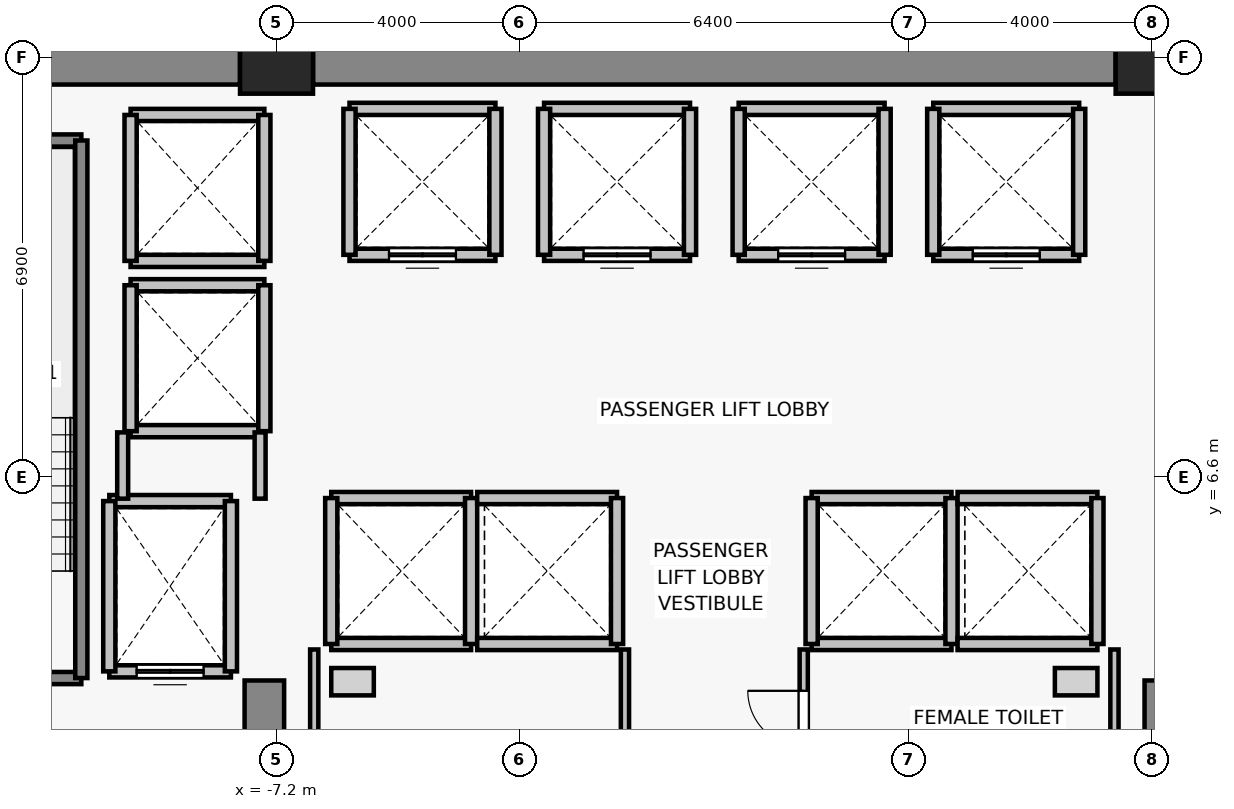
"""IFC4 building model, lengths in metres.
Left out: names, types, materials, properties, quantities, classifications, styles, units other than length and angle.
Written with IfcOpenShell. Run it as: python <this file> out.ifc"""

import sys

from ifc_helpers import new_model, si_unit, direction, frame, frame_2d, origin, origin_2d, place, context, subcontext, project, spatial, rectangle, extrude, source, transform, mapped, element, fill, save


model = new_model("IFC4")
c1 = context("Model", 3, precision=1e-05, world=origin(), true_north=direction((0.0, 1.0)))
c2 = subcontext(c1, "Body", "Model", "MODEL_VIEW")
j1 = project(units=[si_unit("LENGTHUNIT", "METRE"), si_unit("PLANEANGLEUNIT", "RADIAN")], contexts=[c1])
p1 = place(None, origin())
s1 = spatial("IfcSite", under=j1, at=p1, CompositionType="ELEMENT")
p2 = place(p1, origin())
s2 = spatial("IfcBuilding", under=s1, at=p2, CompositionType="ELEMENT")
p3 = place(p2, frame((0.0, 0.0, 60.4)))
s3 = spatial("IfcBuildingStorey", under=s2, at=p3, CompositionType="ELEMENT", Elevation=60.4)
for number, where, z_axis, x_axis in (
    (1, (-7.2, 13.5, 0.0), (0.0, 0.0, 1.0), (1.0, 0.0, 0.0)),
    (2, (7.2, 13.5, 0.0), (0.0, 0.0, 1.0), (1.0, 0.0, 0.0)),
):
    element("IfcColumn", number, at=place(p3, frame(where, z_axis=z_axis, x_axis=x_axis)), inside=s3, PredefinedType="COLUMN", context=c2, shape_type="SweptSolid", body=[
        extrude(rectangle(XDim=1.2, YDim=1.2, at=origin_2d()), origin(), (0.0, 0.0, 1.0), 3.3),
    ])
p4 = place(p3, frame((-13.8, 13.5, 0.0), z_axis=(0.0, 0.0, 1.0), x_axis=(1.0, 0.0, 0.0)))
e3 = element("IfcWall", 3, at=p4, inside=s3, PredefinedType="SHEAR", context=c2, shape_type="SweptSolid", body=[
    extrude(rectangle(XDim=6.0, YDim=0.9, at=frame_2d((3.0, 0.0))), origin(), (0.0, 0.0, 1.0), 3.075),
])
p5 = place(p3, frame((-6.6, 13.5, 0.0), z_axis=(0.0, 0.0, 1.0), x_axis=(1.0, 0.0, 0.0)))
e4 = element("IfcWall", 4, at=p5, inside=s3, PredefinedType="SHEAR", context=c2, shape_type="SweptSolid", body=[
    extrude(rectangle(XDim=13.2, YDim=0.9, at=frame_2d((6.6, 0.0))), origin(), (0.0, 0.0, 1.0), 3.075),
])
for number, where, z_axis, x_axis in (
    (5, (-7.4, -0.75, 0.0), (0.0, 0.0, 1.0), (0.0, 1.0, 0.0)),
    (6, (7.4, -0.75, 0.0), (0.0, 0.0, 1.0), (0.0, 1.0, 0.0)),
):
    element("IfcWall", number, at=place(p3, frame(where, z_axis=z_axis, x_axis=x_axis)), inside=s3, PredefinedType="SHEAR", context=c2, shape_type="SweptSolid", body=[
        extrude(rectangle(XDim=4.0, YDim=0.65, at=frame_2d((2.0, 0.0))), origin(), (0.0, 0.0, 1.0), 3.075),
    ])
p6 = place(p3, frame((-7.95, 3.4, 0.0), z_axis=(0.0, 0.0, 1.0), x_axis=(-1.0, 0.0, 0.0)))
e7 = element("IfcWall", 7, at=p6, inside=s3, PredefinedType="SOLIDWALL", context=c2, shape_type="SweptSolid", body=[
    extrude(rectangle(XDim=2.0, YDim=0.2, at=frame_2d((1.0, 0.0))), origin(), (0.0, 0.0, 1.0), 3.075),
])
p7 = place(p6, frame((0.45, 0.0, 0.0)))
e8 = element("IfcOpeningElement", 8, at=p7, cuts=e7, PredefinedType="OPENING", context=c2, shape_type="SweptSolid", body=[
    extrude(rectangle(XDim=1.1, YDim=2.2, at=frame_2d((0.55, 1.1))), frame((0.0, 0.11, 0.0), z_axis=(0.0, -1.0, 0.0), x_axis=(1.0, 0.0, 0.0)), (0.0, 0.0, 1.0), 0.22),
])
p8 = place(p3, frame((-9.95, 6.2, 0.0), z_axis=(0.0, 0.0, 1.0), x_axis=(1.0, 0.0, 0.0)))
e9 = element("IfcWall", 9, at=p8, inside=s3, PredefinedType="SOLIDWALL", context=c2, shape_type="SweptSolid", body=[
    extrude(rectangle(XDim=2.0, YDim=0.2, at=frame_2d((1.0, 0.0))), origin(), (0.0, 0.0, 1.0), 3.075),
])
for number, where, z_axis, x_axis in (
    (10, (-9.95, 3.4, 0.0), (0.0, 0.0, 1.0), (0.0, 1.0, 0.0)),
    (11, (-7.95, 6.2, 0.0), (0.0, 0.0, 1.0), (0.0, -1.0, 0.0)),
):
    element("IfcWall", number, at=place(p3, frame(where, z_axis=z_axis, x_axis=x_axis)), inside=s3, PredefinedType="SOLIDWALL", context=c2, shape_type="SweptSolid", body=[
        extrude(rectangle(XDim=2.8, YDim=0.2, at=frame_2d((1.4, 0.0))), origin(), (0.0, 0.0, 1.0), 3.075),
    ])
p9 = place(p3, frame((-3.6, 10.25, 0.0), z_axis=(0.0, 0.0, 1.0), x_axis=(-1.0, 0.0, 0.0)))
e12 = element("IfcWall", 12, at=p9, inside=s3, PredefinedType="SOLIDWALL", context=c2, shape_type="SweptSolid", body=[
    extrude(rectangle(XDim=2.4, YDim=0.2, at=frame_2d((1.2, 0.0))), origin(), (0.0, 0.0, 1.0), 3.075),
])
p10 = place(p9, frame((0.65, 0.0, 0.0)))
e13 = element("IfcOpeningElement", 13, at=p10, cuts=e12, PredefinedType="OPENING", context=c2, shape_type="SweptSolid", body=[
    extrude(rectangle(XDim=1.1, YDim=2.2, at=frame_2d((0.55, 1.1))), frame((0.0, 0.11, 0.0), z_axis=(0.0, -1.0, 0.0), x_axis=(1.0, 0.0, 0.0)), (0.0, 0.0, 1.0), 0.22),
])
for number, where, z_axis, x_axis in (
    (14, (-6.0, 12.65, 0.0), (0.0, 0.0, 1.0), (1.0, 0.0, 0.0)),
    (15, (-6.0, 10.25, 0.0), (0.0, 0.0, 1.0), (0.0, 1.0, 0.0)),
    (16, (-3.6, 12.65, 0.0), (0.0, 0.0, 1.0), (0.0, -1.0, 0.0)),
):
    element("IfcWall", number, at=place(p3, frame(where, z_axis=z_axis, x_axis=x_axis)), inside=s3, PredefinedType="SOLIDWALL", context=c2, shape_type="SweptSolid", body=[
        extrude(rectangle(XDim=2.4, YDim=0.2, at=frame_2d((1.2, 0.0))), origin(), (0.0, 0.0, 1.0), 3.075),
    ])
p11 = place(p3, frame((-0.4, 10.25, 0.0), z_axis=(0.0, 0.0, 1.0), x_axis=(-1.0, 0.0, 0.0)))
e17 = element("IfcWall", 17, at=p11, inside=s3, PredefinedType="SOLIDWALL", context=c2, shape_type="SweptSolid", body=[
    extrude(rectangle(XDim=2.4, YDim=0.2, at=frame_2d((1.2, 0.0))), origin(), (0.0, 0.0, 1.0), 3.075),
])
p12 = place(p11, frame((0.65, 0.0, 0.0)))
e18 = element("IfcOpeningElement", 18, at=p12, cuts=e17, PredefinedType="OPENING", context=c2, shape_type="SweptSolid", body=[
    extrude(rectangle(XDim=1.1, YDim=2.2, at=frame_2d((0.55, 1.1))), frame((0.0, 0.11, 0.0), z_axis=(0.0, -1.0, 0.0), x_axis=(1.0, 0.0, 0.0)), (0.0, 0.0, 1.0), 0.22),
])
p13 = place(p3, frame((-2.8, 12.65, 0.0), z_axis=(0.0, 0.0, 1.0), x_axis=(1.0, 0.0, 0.0)))
e19 = element("IfcWall", 19, at=p13, inside=s3, PredefinedType="SOLIDWALL", context=c2, shape_type="SweptSolid", body=[
    extrude(rectangle(XDim=2.4, YDim=0.2, at=frame_2d((1.2, 0.0))), origin(), (0.0, 0.0, 1.0), 3.075),
])
for number, where, z_axis, x_axis in (
    (20, (-2.8, 10.25, 0.0), (0.0, 0.0, 1.0), (0.0, 1.0, 0.0)),
    (21, (-0.4, 12.65, 0.0), (0.0, 0.0, 1.0), (0.0, -1.0, 0.0)),
):
    element("IfcWall", number, at=place(p3, frame(where, z_axis=z_axis, x_axis=x_axis)), inside=s3, PredefinedType="SOLIDWALL", context=c2, shape_type="SweptSolid", body=[
        extrude(rectangle(XDim=2.4, YDim=0.2, at=frame_2d((1.2, 0.0))), origin(), (0.0, 0.0, 1.0), 3.075),
    ])
p14 = place(p3, frame((2.8, 10.25, 0.0), z_axis=(0.0, 0.0, 1.0), x_axis=(-1.0, 0.0, 0.0)))
e22 = element("IfcWall", 22, at=p14, inside=s3, PredefinedType="SOLIDWALL", context=c2, shape_type="SweptSolid", body=[
    extrude(rectangle(XDim=2.4, YDim=0.2, at=frame_2d((1.2, 0.0))), origin(), (0.0, 0.0, 1.0), 3.075),
])
p15 = place(p14, frame((0.65, 0.0, 0.0)))
e23 = element("IfcOpeningElement", 23, at=p15, cuts=e22, PredefinedType="OPENING", context=c2, shape_type="SweptSolid", body=[
    extrude(rectangle(XDim=1.1, YDim=2.2, at=frame_2d((0.55, 1.1))), frame((0.0, 0.11, 0.0), z_axis=(0.0, -1.0, 0.0), x_axis=(1.0, 0.0, 0.0)), (0.0, 0.0, 1.0), 0.22),
])
p16 = place(p3, frame((0.4, 12.65, 0.0), z_axis=(0.0, 0.0, 1.0), x_axis=(1.0, 0.0, 0.0)))
e24 = element("IfcWall", 24, at=p16, inside=s3, PredefinedType="SOLIDWALL", context=c2, shape_type="SweptSolid", body=[
    extrude(rectangle(XDim=2.4, YDim=0.2, at=frame_2d((1.2, 0.0))), origin(), (0.0, 0.0, 1.0), 3.075),
])
for number, where, z_axis, x_axis in (
    (25, (0.4, 10.25, 0.0), (0.0, 0.0, 1.0), (0.0, 1.0, 0.0)),
    (26, (2.8, 12.65, 0.0), (0.0, 0.0, 1.0), (0.0, -1.0, 0.0)),
):
    element("IfcWall", number, at=place(p3, frame(where, z_axis=z_axis, x_axis=x_axis)), inside=s3, PredefinedType="SOLIDWALL", context=c2, shape_type="SweptSolid", body=[
        extrude(rectangle(XDim=2.4, YDim=0.2, at=frame_2d((1.2, 0.0))), origin(), (0.0, 0.0, 1.0), 3.075),
    ])
p17 = place(p3, frame((6.0, 10.25, 0.0), z_axis=(0.0, 0.0, 1.0), x_axis=(-1.0, 0.0, 0.0)))
e27 = element("IfcWall", 27, at=p17, inside=s3, PredefinedType="SOLIDWALL", context=c2, shape_type="SweptSolid", body=[
    extrude(rectangle(XDim=2.4, YDim=0.2, at=frame_2d((1.2, 0.0))), origin(), (0.0, 0.0, 1.0), 3.075),
])
p18 = place(p17, frame((0.65, 0.0, 0.0)))
e28 = element("IfcOpeningElement", 28, at=p18, cuts=e27, PredefinedType="OPENING", context=c2, shape_type="SweptSolid", body=[
    extrude(rectangle(XDim=1.1, YDim=2.2, at=frame_2d((0.55, 1.1))), frame((0.0, 0.11, 0.0), z_axis=(0.0, -1.0, 0.0), x_axis=(1.0, 0.0, 0.0)), (0.0, 0.0, 1.0), 0.22),
])
for number, where, z_axis, x_axis in (
    (29, (3.6, 12.65, 0.0), (0.0, 0.0, 1.0), (1.0, 0.0, 0.0)),
    (30, (3.6, 10.25, 0.0), (0.0, 0.0, 1.0), (0.0, 1.0, 0.0)),
    (31, (6.0, 12.65, 0.0), (0.0, 0.0, 1.0), (0.0, -1.0, 0.0)),
):
    element("IfcWall", number, at=place(p3, frame(where, z_axis=z_axis, x_axis=x_axis)), inside=s3, PredefinedType="SOLIDWALL", context=c2, shape_type="SweptSolid", body=[
        extrude(rectangle(XDim=2.4, YDim=0.2, at=frame_2d((1.2, 0.0))), origin(), (0.0, 0.0, 1.0), 3.075),
    ])
for number, where, z_axis, x_axis in (
    (32, (-4.0, 3.85, 0.0), (0.0, 0.0, 1.0), (-1.0, 0.0, 0.0)),
    (33, (-6.3, 6.25, 0.0), (0.0, 0.0, 1.0), (1.0, 0.0, 0.0)),
):
    element("IfcWall", number, at=place(p3, frame(where, z_axis=z_axis, x_axis=x_axis)), inside=s3, PredefinedType="SOLIDWALL", context=c2, shape_type="SweptSolid", body=[
        extrude(rectangle(XDim=2.3, YDim=0.2, at=frame_2d((1.15, 0.0))), origin(), (0.0, 0.0, 1.0), 3.075),
    ])
for number, where, z_axis, x_axis in (
    (34, (-6.3, 3.85, 0.0), (0.0, 0.0, 1.0), (0.0, 1.0, 0.0)),
    (35, (-4.0, 6.25, 0.0), (0.0, 0.0, 1.0), (0.0, -1.0, 0.0)),
):
    element("IfcWall", number, at=place(p3, frame(where, z_axis=z_axis, x_axis=x_axis)), inside=s3, PredefinedType="SOLIDWALL", context=c2, shape_type="SweptSolid", body=[
        extrude(rectangle(XDim=2.4, YDim=0.2, at=frame_2d((1.2, 0.0))), origin(), (0.0, 0.0, 1.0), 3.075),
    ])
for number, where, z_axis, x_axis in (
    (36, (-1.6, 3.85, 0.0), (0.0, 0.0, 1.0), (-1.0, 0.0, 0.0)),
    (37, (-3.9, 6.25, 0.0), (0.0, 0.0, 1.0), (1.0, 0.0, 0.0)),
):
    element("IfcWall", number, at=place(p3, frame(where, z_axis=z_axis, x_axis=x_axis)), inside=s3, PredefinedType="SOLIDWALL", context=c2, shape_type="SweptSolid", body=[
        extrude(rectangle(XDim=2.3, YDim=0.2, at=frame_2d((1.15, 0.0))), origin(), (0.0, 0.0, 1.0), 3.075),
    ])
p19 = place(p3, frame((-1.6, 6.25, 0.0), z_axis=(0.0, 0.0, 1.0), x_axis=(0.0, -1.0, 0.0)))
e38 = element("IfcWall", 38, at=p19, inside=s3, PredefinedType="SOLIDWALL", context=c2, shape_type="SweptSolid", body=[
    extrude(rectangle(XDim=2.4, YDim=0.2, at=frame_2d((1.2, 0.0))), origin(), (0.0, 0.0, 1.0), 3.075),
])
for number, where, z_axis, x_axis in (
    (39, (3.9, 3.85, 0.0), (0.0, 0.0, 1.0), (-1.0, 0.0, 0.0)),
    (40, (1.6, 6.25, 0.0), (0.0, 0.0, 1.0), (1.0, 0.0, 0.0)),
):
    element("IfcWall", number, at=place(p3, frame(where, z_axis=z_axis, x_axis=x_axis)), inside=s3, PredefinedType="SOLIDWALL", context=c2, shape_type="SweptSolid", body=[
        extrude(rectangle(XDim=2.3, YDim=0.2, at=frame_2d((1.15, 0.0))), origin(), (0.0, 0.0, 1.0), 3.075),
    ])
for number, where, z_axis, x_axis in (
    (41, (1.6, 3.85, 0.0), (0.0, 0.0, 1.0), (0.0, 1.0, 0.0)),
    (42, (3.9, 6.25, 0.0), (0.0, 0.0, 1.0), (0.0, -1.0, 0.0)),
):
    element("IfcWall", number, at=place(p3, frame(where, z_axis=z_axis, x_axis=x_axis)), inside=s3, PredefinedType="SOLIDWALL", context=c2, shape_type="SweptSolid", body=[
        extrude(rectangle(XDim=2.4, YDim=0.2, at=frame_2d((1.2, 0.0))), origin(), (0.0, 0.0, 1.0), 3.075),
    ])
for number, where, z_axis, x_axis in (
    (43, (6.3, 3.85, 0.0), (0.0, 0.0, 1.0), (-1.0, 0.0, 0.0)),
    (44, (4.0, 6.25, 0.0), (0.0, 0.0, 1.0), (1.0, 0.0, 0.0)),
):
    element("IfcWall", number, at=place(p3, frame(where, z_axis=z_axis, x_axis=x_axis)), inside=s3, PredefinedType="SOLIDWALL", context=c2, shape_type="SweptSolid", body=[
        extrude(rectangle(XDim=2.3, YDim=0.2, at=frame_2d((1.15, 0.0))), origin(), (0.0, 0.0, 1.0), 3.075),
    ])
p20 = place(p3, frame((6.3, 6.25, 0.0), z_axis=(0.0, 0.0, 1.0), x_axis=(0.0, -1.0, 0.0)))
e45 = element("IfcWall", 45, at=p20, inside=s3, PredefinedType="SOLIDWALL", context=c2, shape_type="SweptSolid", body=[
    extrude(rectangle(XDim=2.4, YDim=0.2, at=frame_2d((1.2, 0.0))), origin(), (0.0, 0.0, 1.0), 3.075),
])
for number, where, z_axis, x_axis in (
    (46, (-7.4, 7.35, 0.0), (0.0, 0.0, 1.0), (-1.0, 0.0, 0.0)),
    (47, (-9.6, 9.75, 0.0), (0.0, 0.0, 1.0), (1.0, 0.0, 0.0)),
):
    element("IfcWall", number, at=place(p3, frame(where, z_axis=z_axis, x_axis=x_axis)), inside=s3, PredefinedType="SOLIDWALL", context=c2, shape_type="SweptSolid", body=[
        extrude(rectangle(XDim=2.2, YDim=0.2, at=frame_2d((1.1, 0.0))), origin(), (0.0, 0.0, 1.0), 2.465),
    ])
p21 = place(p3, frame((-9.6, 7.35, 0.0), z_axis=(0.0, 0.0, 1.0), x_axis=(0.0, 1.0, 0.0)))
e48 = element("IfcWall", 48, at=p21, inside=s3, PredefinedType="SOLIDWALL", context=c2, shape_type="SweptSolid", body=[
    extrude(rectangle(XDim=2.4, YDim=0.2, at=frame_2d((1.2, 0.0))), origin(), (0.0, 0.0, 1.0), 3.075),
])
p22 = place(p3, frame((-7.4, 9.75, 0.0), z_axis=(0.0, 0.0, 1.0), x_axis=(0.0, -1.0, 0.0)))
e49 = element("IfcWall", 49, at=p22, inside=s3, PredefinedType="SOLIDWALL", context=c2, shape_type="SweptSolid", body=[
    extrude(rectangle(XDim=2.4, YDim=0.2, at=frame_2d((1.2, 0.0))), origin(), (0.0, 0.0, 1.0), 2.465),
])
for number, where, z_axis, x_axis in (
    (50, (-7.4, 10.15, 0.0), (0.0, 0.0, 1.0), (-1.0, 0.0, 0.0)),
    (51, (-9.6, 12.55, 0.0), (0.0, 0.0, 1.0), (1.0, 0.0, 0.0)),
):
    element("IfcWall", number, at=place(p3, frame(where, z_axis=z_axis, x_axis=x_axis)), inside=s3, PredefinedType="SOLIDWALL", context=c2, shape_type="SweptSolid", body=[
        extrude(rectangle(XDim=2.2, YDim=0.2, at=frame_2d((1.1, 0.0))), origin(), (0.0, 0.0, 1.0), 2.465),
    ])
p23 = place(p3, frame((-9.6, 10.15, 0.0), z_axis=(0.0, 0.0, 1.0), x_axis=(0.0, 1.0, 0.0)))
e52 = element("IfcWall", 52, at=p23, inside=s3, PredefinedType="SOLIDWALL", context=c2, shape_type="SweptSolid", body=[
    extrude(rectangle(XDim=2.4, YDim=0.2, at=frame_2d((1.2, 0.0))), origin(), (0.0, 0.0, 1.0), 3.075),
])
p24 = place(p3, frame((-7.4, 12.55, 0.0), z_axis=(0.0, 0.0, 1.0), x_axis=(0.0, -1.0, 0.0)))
e53 = element("IfcWall", 53, at=p24, inside=s3, PredefinedType="SOLIDWALL", context=c2, shape_type="SweptSolid", body=[
    extrude(rectangle(XDim=2.4, YDim=0.2, at=frame_2d((1.2, 0.0))), origin(), (0.0, 0.0, 1.0), 2.465),
])
p25 = place(p3, frame((-10.41, 3.29, 0.0), z_axis=(0.0, 0.0, 1.0), x_axis=(-1.0, 0.0, 0.0)))
e54 = element("IfcWall", 54, at=p25, inside=s3, PredefinedType="SOLIDWALL", context=c2, shape_type="SweptSolid", body=[
    extrude(rectangle(XDim=3.52, YDim=0.2, at=frame_2d((1.76, 0.0))), origin(), (0.0, 0.0, 1.0), 3.075),
])
p26 = place(p25, frame((1.165, 0.0, 0.0)))
e55 = element("IfcOpeningElement", 55, at=p26, cuts=e54, PredefinedType="OPENING", context=c2, shape_type="SweptSolid", body=[
    extrude(rectangle(XDim=1.15, YDim=2.15, at=frame_2d((0.575, 1.075))), frame((0.0, 0.11, 0.0), z_axis=(0.0, -1.0, 0.0), x_axis=(1.0, 0.0, 0.0)), (0.0, 0.0, 1.0), 0.22),
])
p27 = place(p3, frame((-13.93, 12.13, 0.0), z_axis=(0.0, 0.0, 1.0), x_axis=(1.0, 0.0, 0.0)))
e56 = element("IfcWall", 56, at=p27, inside=s3, PredefinedType="SOLIDWALL", context=c2, shape_type="SweptSolid", body=[
    extrude(rectangle(XDim=3.52, YDim=0.2, at=frame_2d((1.76, 0.0))), origin(), (0.0, 0.0, 1.0), 3.075),
])
p28 = place(p3, frame((-10.41, 12.13, 0.0), z_axis=(0.0, 0.0, 1.0), x_axis=(0.0, -1.0, 0.0)))
e57 = element("IfcWall", 57, at=p28, inside=s3, PredefinedType="SOLIDWALL", context=c2, shape_type="SweptSolid", body=[
    extrude(rectangle(XDim=8.84, YDim=0.2, at=frame_2d((4.42, 0.0))), origin(), (0.0, 0.0, 1.0), 3.075),
])
p29 = place(p3, frame((-9.73, 6.24, 0.0), z_axis=(0.0, 0.0, 1.0), x_axis=(0.0, 1.0, 0.0)))
e58 = element("IfcWall", 58, at=p29, inside=s3, PredefinedType="PARTITIONING", context=c2, shape_type="SweptSolid", body=[
    extrude(rectangle(XDim=1.09, YDim=0.18, at=frame_2d((0.545, 0.0))), origin(), (0.0, 0.0, 1.0), 3.075),
])
p30 = place(p3, frame((-7.47, 7.33, 0.0), z_axis=(0.0, 0.0, 1.0), x_axis=(0.0, -1.0, 0.0)))
e59 = element("IfcWall", 59, at=p30, inside=s3, PredefinedType="PARTITIONING", context=c2, shape_type="SweptSolid", body=[
    extrude(rectangle(XDim=1.09, YDim=0.18, at=frame_2d((0.545, 0.0))), origin(), (0.0, 0.0, 1.0), 2.465),
])
p31 = place(p3, frame((-6.58, -0.73, 0.0), z_axis=(0.0, 0.0, 1.0), x_axis=(0.0, 1.0, 0.0)))
e60 = element("IfcWall", 60, at=p31, inside=s3, PredefinedType="PARTITIONING", context=c2, shape_type="SweptSolid", body=[
    extrude(rectangle(XDim=4.49, YDim=0.135, at=frame_2d((2.245, 0.0))), origin(), (0.0, 0.0, 1.0), 3.075),
])
p32 = place(p3, frame((-1.47, 3.76, 0.0), z_axis=(0.0, 0.0, 1.0), x_axis=(0.0, -1.0, 0.0)))
e61 = element("IfcWall", 61, at=p32, inside=s3, PredefinedType="PARTITIONING", context=c2, shape_type="SweptSolid", body=[
    extrude(rectangle(XDim=4.49, YDim=0.135, at=frame_2d((2.245, 0.0))), origin(), (0.0, 0.0, 1.0), 3.075),
])
p33 = place(p32, frame((1.8, 0.0, 0.0)))
e62 = element("IfcOpeningElement", 62, at=p33, cuts=e61, PredefinedType="OPENING", context=c2, shape_type="SweptSolid", body=[
    extrude(rectangle(XDim=0.92, YDim=2.1, at=frame_2d((0.46, 1.05))), frame((0.0, 0.077, 0.0), z_axis=(0.0, -1.0, 0.0), x_axis=(1.0, 0.0, 0.0)), (0.0, 0.0, 1.0), 0.155),
])
p34 = place(p3, frame((1.47, 1.48, 0.0), z_axis=(0.0, 0.0, 1.0), x_axis=(0.0, 1.0, 0.0)))
e63 = element("IfcWall", 63, at=p34, inside=s3, PredefinedType="PARTITIONING", context=c2, shape_type="SweptSolid", body=[
    extrude(rectangle(XDim=2.28, YDim=0.135, at=frame_2d((1.14, 0.0))), origin(), (0.0, 0.0, 1.0), 3.075),
])
p35 = place(p34, frame((0.68, 0.0, 0.0)))
e64 = element("IfcOpeningElement", 64, at=p35, cuts=e63, PredefinedType="OPENING", context=c2, shape_type="SweptSolid", body=[
    extrude(rectangle(XDim=0.92, YDim=2.1, at=frame_2d((0.46, 1.05))), frame((0.0, 0.077, 0.0), z_axis=(0.0, -1.0, 0.0), x_axis=(1.0, 0.0, 0.0)), (0.0, 0.0, 1.0), 0.155),
])
p36 = place(p3, frame((6.58, 3.76, 0.0), z_axis=(0.0, 0.0, 1.0), x_axis=(0.0, -1.0, 0.0)))
e65 = element("IfcWall", 65, at=p36, inside=s3, PredefinedType="PARTITIONING", context=c2, shape_type="SweptSolid", body=[
    extrude(rectangle(XDim=2.28, YDim=0.135, at=frame_2d((1.14, 0.0))), origin(), (0.0, 0.0, 1.0), 3.075),
])
m1 = source(origin(), c2, "Body", "SweptSolid", [
    extrude(rectangle(XDim=1.1, YDim=2.2, at=frame_2d((0.55, 1.1))), frame((0.0, 0.025, 0.0), z_axis=(0.0, -1.0, 0.0), x_axis=(1.0, 0.0, 0.0)), (0.0, 0.0, 1.0), 0.05),
])
p37 = place(p7, origin())
e66 = element("IfcDoor", 66, at=p37, inside=s3, OperationType="DOUBLE_DOOR_SLIDING", PredefinedType="DOOR", context=c2, shape_type="MappedRepresentation", body=[
    mapped(m1, transform((0.0, 0.0, 0.0), x_axis=(1.0, 0.0, 0.0), y_axis=(0.0, 1.0, 0.0), z_axis=(0.0, 0.0, 1.0), scale=1.0)),
])
fill(e8, e66)
p38 = place(p10, origin())
e67 = element("IfcDoor", 67, at=p38, inside=s3, OperationType="DOUBLE_DOOR_SLIDING", PredefinedType="DOOR", context=c2, shape_type="MappedRepresentation", body=[
    mapped(m1, transform((0.0, 0.0, 0.0), x_axis=(1.0, 0.0, 0.0), y_axis=(0.0, 1.0, 0.0), z_axis=(0.0, 0.0, 1.0), scale=1.0)),
])
fill(e13, e67)
p39 = place(p12, origin())
e68 = element("IfcDoor", 68, at=p39, inside=s3, OperationType="DOUBLE_DOOR_SLIDING", PredefinedType="DOOR", context=c2, shape_type="MappedRepresentation", body=[
    mapped(m1, transform((0.0, 0.0, 0.0), x_axis=(1.0, 0.0, 0.0), y_axis=(0.0, 1.0, 0.0), z_axis=(0.0, 0.0, 1.0), scale=1.0)),
])
fill(e18, e68)
p40 = place(p15, origin())
e69 = element("IfcDoor", 69, at=p40, inside=s3, OperationType="DOUBLE_DOOR_SLIDING", PredefinedType="DOOR", context=c2, shape_type="MappedRepresentation", body=[
    mapped(m1, transform((0.0, 0.0, 0.0), x_axis=(1.0, 0.0, 0.0), y_axis=(0.0, 1.0, 0.0), z_axis=(0.0, 0.0, 1.0), scale=1.0)),
])
fill(e23, e69)
p41 = place(p18, origin())
e70 = element("IfcDoor", 70, at=p41, inside=s3, OperationType="DOUBLE_DOOR_SLIDING", PredefinedType="DOOR", context=c2, shape_type="MappedRepresentation", body=[
    mapped(m1, transform((0.0, 0.0, 0.0), x_axis=(1.0, 0.0, 0.0), y_axis=(0.0, 1.0, 0.0), z_axis=(0.0, 0.0, 1.0), scale=1.0)),
])
fill(e28, e70)
m2 = source(origin(), c2, "Body", "SweptSolid", [
    extrude(rectangle(XDim=0.92, YDim=2.1, at=frame_2d((0.46, 1.05))), frame((0.0, 0.025, 0.0), z_axis=(0.0, -1.0, 0.0), x_axis=(1.0, 0.0, 0.0)), (0.0, 0.0, 1.0), 0.05),
])
p42 = place(p35, origin())
e71 = element("IfcDoor", 71, at=p42, inside=s3, OperationType="SINGLE_SWING_RIGHT", PredefinedType="DOOR", context=c2, shape_type="MappedRepresentation", body=[
    mapped(m2, transform((0.0, 0.0, 0.0), x_axis=(1.0, 0.0, 0.0), y_axis=(0.0, 1.0, 0.0), z_axis=(0.0, 0.0, 1.0), scale=1.0)),
])
fill(e64, e71)
save(model, sys.argv[1])
